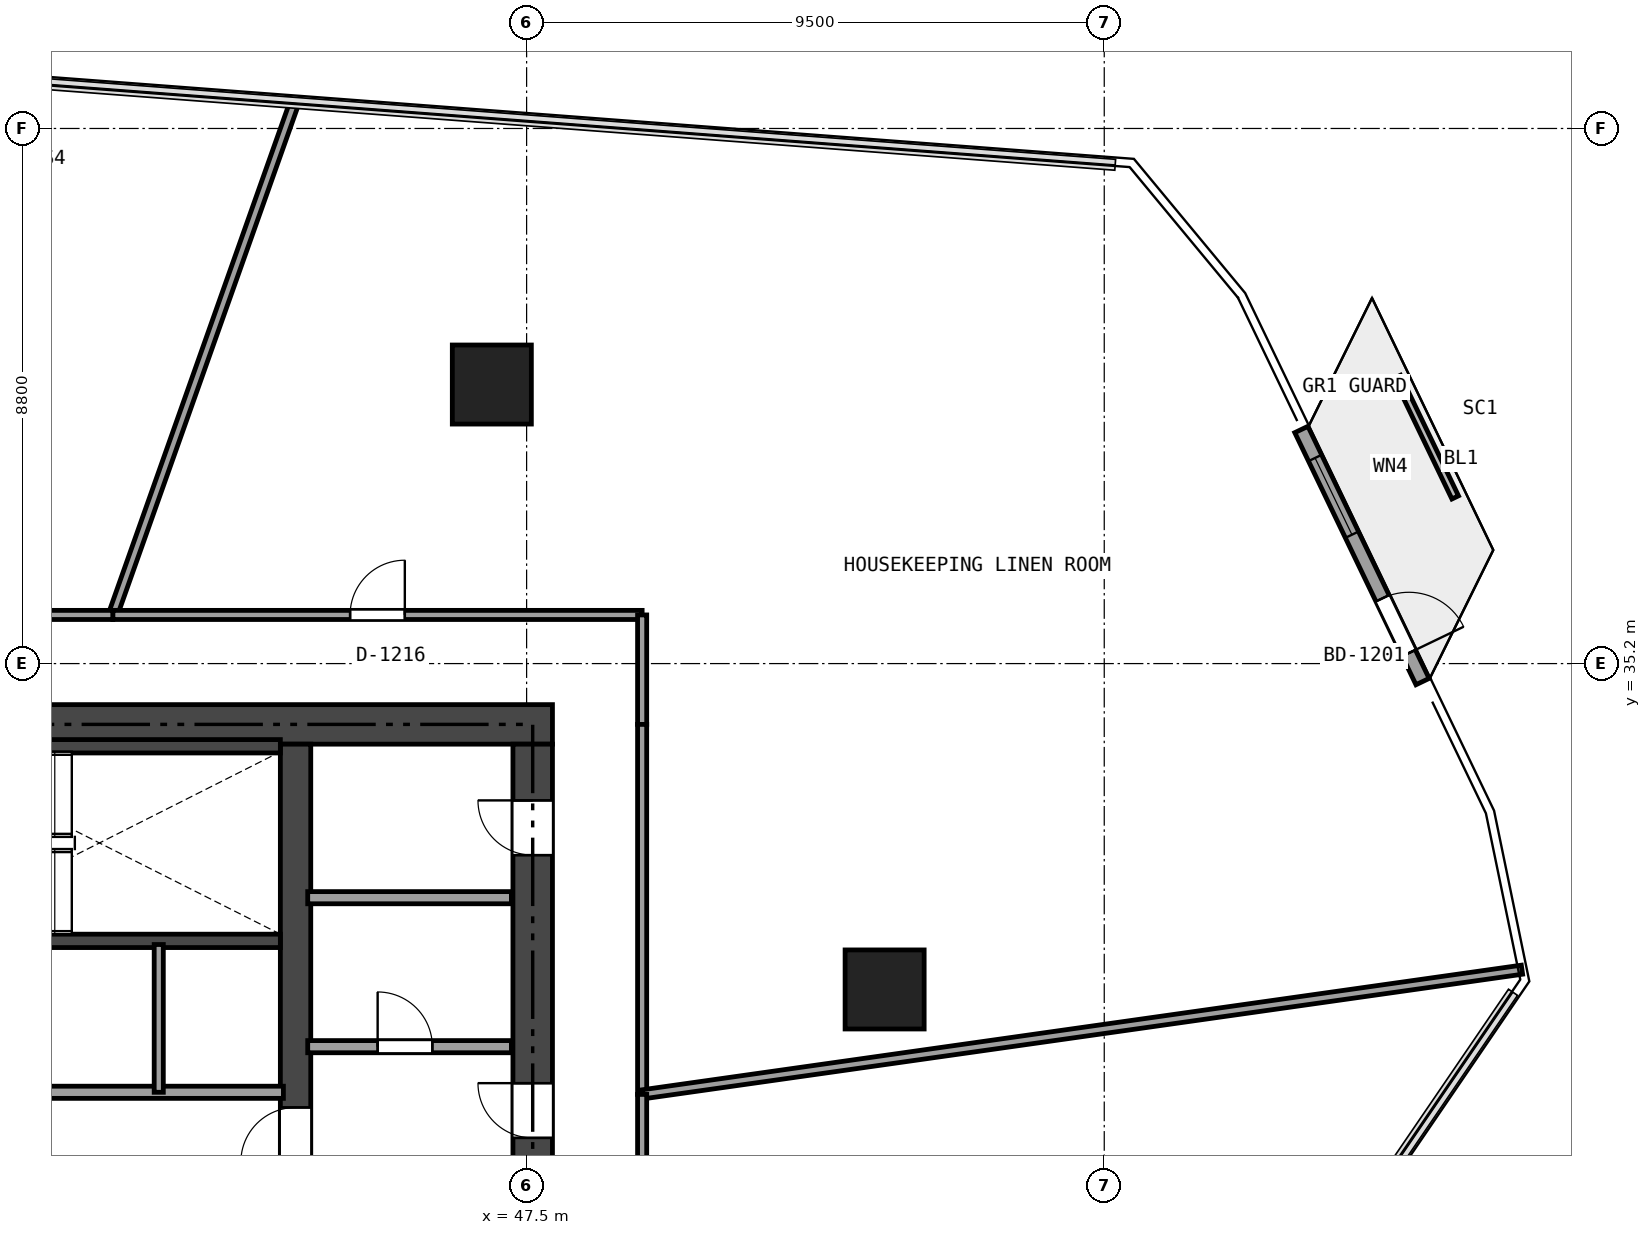
"""IFC4 building model, lengths in metres.
Left out: names, types, materials, properties, quantities, classifications, styles, units other than length and angle.
Written with IfcOpenShell. Run it as: python <this file> out.ifc"""

import sys

from ifc_helpers import new_model, si_unit, direction, frame, frame_2d, origin, origin_2d, place, context, subcontext, project, spatial, rectangle, extrude, element, fill, save


model = new_model("IFC4")
c1 = context("Model", 3, precision=1e-05, world=origin(), true_north=direction((0.0, 1.0)))
c2 = subcontext(c1, "Body", "Model", "MODEL_VIEW")
j1 = project(units=[si_unit("LENGTHUNIT", "METRE"), si_unit("PLANEANGLEUNIT", "RADIAN")], contexts=[c1])
p1 = place(None, origin())
s1 = spatial("IfcSite", under=j1, at=p1, CompositionType="ELEMENT")
p2 = place(p1, origin())
s2 = spatial("IfcBuilding", under=s1, at=p2, CompositionType="ELEMENT")
p3 = place(p2, frame((0.0, 0.0, 51.15)))
s3 = spatial("IfcBuildingStorey", under=s2, at=p3, CompositionType="ELEMENT", Elevation=51.15)
p4 = place(p3, frame((26.475, 34.2, 0.0), z_axis=(0.0, 0.0, 1.0), x_axis=(1.0, 0.0, 0.0)))
e1 = element("IfcWall", 1, at=p4, inside=s3, PredefinedType="SHEAR", context=c2, shape_type="SweptSolid", body=[
    extrude(rectangle(XDim=21.45, YDim=0.65, at=frame_2d((10.725, 0.0))), origin(), (0.0, 0.0, 1.0), 3.17),
])
p5 = place(p4, frame((9.725, 0.0, 0.0)))
e2 = element("IfcOpeningElement", 2, at=p5, cuts=e1, PredefinedType="OPENING", context=c2, shape_type="SweptSolid", body=[
    extrude(rectangle(XDim=1.1, YDim=2.15, at=frame_2d((0.55, 1.075))), frame((0.0, 0.335, 0.0), z_axis=(0.0, -1.0, 0.0), x_axis=(1.0, 0.0, 0.0)), (0.0, 0.0, 1.0), 0.67),
])
p6 = place(p4, frame((1.975, 0.0, 0.0)))
e3 = element("IfcOpeningElement", 3, at=p6, cuts=e1, PredefinedType="OPENING", context=c2, shape_type="SweptSolid", body=[
    extrude(rectangle(XDim=0.9, YDim=2.1, at=frame_2d((0.45, 1.05))), frame((0.0, 0.335, 0.0), z_axis=(0.0, -1.0, 0.0), x_axis=(1.0, 0.0, 0.0)), (0.0, 0.0, 1.0), 0.67),
])
p7 = place(p4, frame((6.275, 0.0, 0.0)))
e4 = element("IfcOpeningElement", 4, at=p7, cuts=e1, PredefinedType="OPENING", context=c2, shape_type="SweptSolid", body=[
    extrude(rectangle(XDim=0.9, YDim=2.1, at=frame_2d((0.45, 1.05))), frame((0.0, 0.335, 0.0), z_axis=(0.0, -1.0, 0.0), x_axis=(1.0, 0.0, 0.0)), (0.0, 0.0, 1.0), 0.67),
])
p8 = place(p3, frame((47.6, 18.925, 0.0), z_axis=(0.0, 0.0, 1.0), x_axis=(0.0, 1.0, 0.0)))
e5 = element("IfcWall", 5, at=p8, inside=s3, PredefinedType="SHEAR", context=c2, shape_type="SweptSolid", body=[
    extrude(rectangle(XDim=14.95, YDim=0.65, at=frame_2d((7.475, 0.0))), origin(), (0.0, 0.0, 1.0), 3.17),
])
p9 = place(p8, frame((6.575, 0.0, 0.0)))
e6 = element("IfcOpeningElement", 6, at=p9, cuts=e5, PredefinedType="OPENING", context=c2, shape_type="SweptSolid", body=[
    extrude(rectangle(XDim=1.1, YDim=2.15, at=frame_2d((0.55, 1.075))), frame((0.0, 0.335, 0.0), z_axis=(0.0, -1.0, 0.0), x_axis=(1.0, 0.0, 0.0)), (0.0, 0.0, 1.0), 0.67),
])
p10 = place(p8, frame((8.475, 0.0, 0.0)))
e7 = element("IfcOpeningElement", 7, at=p10, cuts=e5, PredefinedType="OPENING", context=c2, shape_type="SweptSolid", body=[
    extrude(rectangle(XDim=0.9, YDim=2.1, at=frame_2d((0.45, 1.05))), frame((0.0, 0.335, 0.0), z_axis=(0.0, -1.0, 0.0), x_axis=(1.0, 0.0, 0.0)), (0.0, 0.0, 1.0), 0.67),
])
p11 = place(p8, frame((13.125, 0.0, 0.0)))
e8 = element("IfcOpeningElement", 8, at=p11, cuts=e5, PredefinedType="OPENING", context=c2, shape_type="SweptSolid", body=[
    extrude(rectangle(XDim=0.9, YDim=2.1, at=frame_2d((0.45, 1.05))), frame((0.0, 0.335, 0.0), z_axis=(0.0, -1.0, 0.0), x_axis=(1.0, 0.0, 0.0)), (0.0, 0.0, 1.0), 0.67),
])
p12 = place(p3, frame((43.7, 18.925, 0.0), z_axis=(0.0, 0.0, 1.0), x_axis=(0.0, 1.0, 0.0)))
e9 = element("IfcWall", 9, at=p12, inside=s3, PredefinedType="SHEAR", context=c2, shape_type="SweptSolid", body=[
    extrude(rectangle(XDim=14.95, YDim=0.5, at=frame_2d((7.475, 0.0))), origin(), (0.0, 0.0, 1.0), 3.17),
])
p13 = place(p12, frame((8.075, 0.0, 0.0)))
e10 = element("IfcOpeningElement", 10, at=p13, cuts=e9, PredefinedType="OPENING", context=c2, shape_type="SweptSolid", body=[
    extrude(rectangle(XDim=0.9, YDim=2.1, at=frame_2d((0.45, 1.05))), frame((0.0, 0.26, 0.0), z_axis=(0.0, -1.0, 0.0), x_axis=(1.0, 0.0, 0.0)), (0.0, 0.0, 1.0), 0.52),
])
p14 = place(p3, frame((35.84, 30.64, 0.0), z_axis=(0.0, 0.0, 1.0), x_axis=(1.0, 0.0, 0.0)))
e11 = element("IfcWall", 11, at=p14, inside=s3, PredefinedType="SHEAR", context=c2, shape_type="SweptSolid", body=[
    extrude(rectangle(XDim=7.61, YDim=0.22, at=frame_2d((3.805, 0.0))), origin(), (0.0, 0.0, 1.0), 3.17),
])
p15 = place(p3, frame((37.55, 33.84, 0.0), z_axis=(0.0, 0.0, 1.0), x_axis=(1.0, 0.0, 0.0)))
e12 = element("IfcWall", 12, at=p15, inside=s3, PredefinedType="SHEAR", context=c2, shape_type="SweptSolid", body=[
    extrude(rectangle(XDim=5.9, YDim=0.22, at=frame_2d((2.95, 0.0))), origin(), (0.0, 0.0, 1.0), 3.17),
])
for number, where, z_axis, x_axis in (
    (13, (53.388, 29.841, 0.0), (0.0, 0.0, 1.0), (1.0, 0.0, 0.0)),
    (14, (46.928, 39.789, 0.0), (0.0, 0.0, 1.0), (1.0, 0.0, 0.0)),
):
    element("IfcColumn", number, at=place(p3, frame(where, z_axis=z_axis, x_axis=x_axis)), inside=s3, PredefinedType="COLUMN", context=c2, shape_type="SweptSolid", body=[
        extrude(rectangle(XDim=1.3, YDim=1.3, at=origin_2d()), origin(), (0.0, 0.0, 1.0), 3.17),
    ])
p16 = place(p3, frame((60.242, 39.05, 0.0), z_axis=(0.0, 0.0, 1.0), x_axis=(0.433276196911, -0.901261192546, 0.0)))
e15 = element("IfcWall", 15, at=p16, inside=s3, PredefinedType="SOLIDWALL", context=c2, shape_type="SweptSolid", body=[
    extrude(rectangle(XDim=4.6, YDim=0.24, at=frame_2d((2.3, 0.0))), origin(), (0.0, 0.0, 1.0), 3.17),
])
p17 = place(p16, frame((3.08, 0.0, 0.0)))
e16 = element("IfcOpeningElement", 16, at=p17, cuts=e15, PredefinedType="OPENING", context=c2, shape_type="SweptSolid", body=[
    extrude(rectangle(XDim=1.0, YDim=2.15, at=frame_2d((0.5, 1.075))), frame((0.0, 0.13, 0.0), z_axis=(0.0, -1.0, 0.0), x_axis=(1.0, 0.0, 0.0)), (0.0, 0.0, 1.0), 0.26),
])
p18 = place(p16, frame((0.52, 0.0, 0.2)))
e17 = element("IfcOpeningElement", 17, at=p18, cuts=e15, PredefinedType="OPENING", context=c2, shape_type="SweptSolid", body=[
    extrude(rectangle(XDim=1.4, YDim=1.95, at=frame_2d((0.7, 0.975))), frame((0.0, 0.13, 0.0), z_axis=(0.0, -1.0, 0.0), x_axis=(1.0, 0.0, 0.0)), (0.0, 0.0, 1.0), 0.26),
])
p19 = place(p3, frame((43.9, 28.9, 0.0), z_axis=(0.0, 0.0, 1.0), x_axis=(1.0, 0.0, 0.0)))
e18 = element("IfcWall", 18, at=p19, inside=s3, PredefinedType="SOLIDWALL", context=c2, shape_type="SweptSolid", body=[
    extrude(rectangle(XDim=3.35, YDim=0.2, at=frame_2d((1.675, 0.0))), origin(), (0.0, 0.0, 1.0), 3.17),
])
p20 = place(p19, frame((1.15, 0.0, 0.0)))
e19 = element("IfcOpeningElement", 19, at=p20, cuts=e18, PredefinedType="OPENING", context=c2, shape_type="SweptSolid", body=[
    extrude(rectangle(XDim=0.9, YDim=2.1, at=frame_2d((0.45, 1.05))), frame((0.0, 0.11, 0.0), z_axis=(0.0, -1.0, 0.0), x_axis=(1.0, 0.0, 0.0)), (0.0, 0.0, 1.0), 0.22),
])
p21 = place(p3, frame((43.9, 31.35, 0.0), z_axis=(0.0, 0.0, 1.0), x_axis=(1.0, 0.0, 0.0)))
e20 = element("IfcWall", 20, at=p21, inside=s3, PredefinedType="SOLIDWALL", context=c2, shape_type="SweptSolid", body=[
    extrude(rectangle(XDim=3.35, YDim=0.2, at=frame_2d((1.675, 0.0))), origin(), (0.0, 0.0, 1.0), 3.17),
])
p22 = place(p3, frame((35.62, 28.15, 0.0), z_axis=(0.0, 0.0, 1.0), x_axis=(1.0, 0.0, 0.0)))
e21 = element("IfcWall", 21, at=p22, inside=s3, PredefinedType="SOLIDWALL", context=c2, shape_type="SweptSolid", body=[
    extrude(rectangle(XDim=7.88, YDim=0.2, at=frame_2d((3.94, 0.0))), origin(), (0.0, 0.0, 1.0), 3.17),
])
p23 = place(p3, frame((41.45, 28.15, 0.0), z_axis=(0.0, 0.0, 1.0), x_axis=(0.0, 1.0, 0.0)))
e22 = element("IfcWall", 22, at=p23, inside=s3, PredefinedType="PARTITIONING", context=c2, shape_type="SweptSolid", body=[
    extrude(rectangle(XDim=2.43, YDim=0.15, at=frame_2d((1.215, 0.0))), origin(), (0.0, 0.0, 1.0), 3.17),
])
p24 = place(p3, frame((43.695, 44.465, 0.0), z_axis=(0.0, 0.0, 1.0), x_axis=(-0.334136466125, -0.94252470631, 0.0)))
e23 = element("IfcWall", 23, at=p24, inside=s3, PredefinedType="PARTITIONING", context=c2, shape_type="SweptSolid", body=[
    extrude(rectangle(XDim=8.981, YDim=0.15, at=frame_2d((4.491, 0.0))), origin(), (0.0, 0.0, 1.0), 2.355),
])
p25 = place(p3, frame((40.694, 36.0, 0.0), z_axis=(0.0, 0.0, 1.0), x_axis=(1.0, 0.0, 0.0)))
e24 = element("IfcWall", 24, at=p25, inside=s3, PredefinedType="PARTITIONING", context=c2, shape_type="SweptSolid", body=[
    extrude(rectangle(XDim=8.706, YDim=0.15, at=frame_2d((4.353, 0.0))), origin(), (0.0, 0.0, 1.0), 2.355),
])
p26 = place(p25, frame((3.903, 0.0, 0.0)))
e25 = element("IfcOpeningElement", 25, at=p26, cuts=e24, PredefinedType="OPENING", context=c2, shape_type="SweptSolid", body=[
    extrude(rectangle(XDim=0.9, YDim=2.0, at=frame_2d((0.45, 1.0))), frame((0.0, 0.085, 0.0), z_axis=(0.0, -1.0, 0.0), x_axis=(1.0, 0.0, 0.0)), (0.0, 0.0, 1.0), 0.17),
])
p27 = place(p3, frame((49.4, 36.0, 0.0), z_axis=(0.0, 0.0, 1.0), x_axis=(0.0, -1.0, 0.0)))
e26 = element("IfcWall", 26, at=p27, inside=s3, PredefinedType="PARTITIONING", context=c2, shape_type="SweptSolid", body=[
    extrude(rectangle(XDim=1.8, YDim=0.15, at=frame_2d((0.9, 0.0))), origin(), (0.0, 0.0, 1.0), 2.355),
])
p28 = place(p3, frame((49.4, 34.2, 0.0), z_axis=(0.0, 0.0, 1.0), x_axis=(0.0, -1.0, 0.0)))
e27 = element("IfcWall", 27, at=p28, inside=s3, PredefinedType="PARTITIONING", context=c2, shape_type="SweptSolid", body=[
    extrude(rectangle(XDim=6.085, YDim=0.15, at=frame_2d((3.042, 0.0))), origin(), (0.0, 0.0, 1.0), 2.395),
])
p29 = place(p3, frame((49.4, 28.115, 0.0), z_axis=(0.0, 0.0, 1.0), x_axis=(0.990103589489, 0.140338455463, 0.0)))
e28 = element("IfcWall", 28, at=p29, inside=s3, PredefinedType="PARTITIONING", context=c2, shape_type="SweptSolid", body=[
    extrude(rectangle(XDim=14.615, YDim=0.15, at=frame_2d((7.307, 0.0))), origin(), (0.0, 0.0, 1.0), 2.355),
])
p30 = place(p3, frame((27.929, 36.0, 0.0), z_axis=(0.0, 0.0, 1.0), x_axis=(1.0, 0.0, 0.0)))
e29 = element("IfcWall", 29, at=p30, inside=s3, PredefinedType="PARTITIONING", context=c2, shape_type="SweptSolid", body=[
    extrude(rectangle(XDim=12.765, YDim=0.15, at=frame_2d((6.383, 0.0))), origin(), (0.0, 0.0, 1.0), 2.395),
])
p31 = place(p30, frame((5.908, 0.0, 0.0)))
e30 = element("IfcOpeningElement", 30, at=p31, cuts=e29, PredefinedType="OPENING", context=c2, shape_type="SweptSolid", body=[
    extrude(rectangle(XDim=0.95, YDim=2.15, at=frame_2d((0.475, 1.075))), frame((0.0, 0.085, 0.0), z_axis=(0.0, -1.0, 0.0), x_axis=(1.0, 0.0, 0.0)), (0.0, 0.0, 1.0), 0.17),
])
p32 = place(p3, frame((49.4, 28.115, 0.0), z_axis=(0.0, 0.0, 1.0), x_axis=(0.0, -1.0, 0.0)))
e31 = element("IfcWall", 31, at=p32, inside=s3, PredefinedType="PARTITIONING", context=c2, shape_type="SweptSolid", body=[
    extrude(rectangle(XDim=9.515, YDim=0.15, at=frame_2d((4.757, 0.0))), origin(), (0.0, 0.0, 1.0), 2.395),
])
p33 = place(p32, frame((4.282, 0.0, 0.0)))
e32 = element("IfcOpeningElement", 32, at=p33, cuts=e31, PredefinedType="OPENING", context=c2, shape_type="SweptSolid", body=[
    extrude(rectangle(XDim=0.95, YDim=2.15, at=frame_2d((0.475, 1.075))), frame((0.0, 0.085, 0.0), z_axis=(0.0, -1.0, 0.0), x_axis=(1.0, 0.0, 0.0)), (0.0, 0.0, 1.0), 0.17),
])
p34 = place(p17, origin())
e33 = element("IfcDoor", 33, at=p34, inside=s3, OperationType="SINGLE_SWING_RIGHT", PredefinedType="DOOR", context=c2, shape_type="SweptSolid", body=[
    extrude(rectangle(XDim=1.0, YDim=2.15, at=frame_2d((0.5, 1.075))), frame((0.0, 0.025, 0.0), z_axis=(0.0, -1.0, 0.0), x_axis=(1.0, 0.0, 0.0)), (0.0, 0.0, 1.0), 0.05),
])
fill(e16, e33)
p35 = place(p18, origin())
e34 = element("IfcWindow", 34, at=p35, inside=s3, PartitioningType="SINGLE_PANEL", PredefinedType="WINDOW", context=c2, shape_type="SweptSolid", body=[
    extrude(rectangle(XDim=1.4, YDim=1.95, at=frame_2d((0.7, 0.975))), frame((0.0, 0.03, 0.0), z_axis=(0.0, -1.0, 0.0), x_axis=(1.0, 0.0, 0.0)), (0.0, 0.0, 1.0), 0.06),
])
fill(e17, e34)
p36 = place(p13, origin())
e35 = element("IfcDoor", 35, at=p36, inside=s3, OperationType="SINGLE_SWING_LEFT", PredefinedType="DOOR", context=c2, shape_type="SweptSolid", body=[
    extrude(rectangle(XDim=0.9, YDim=2.1, at=frame_2d((0.45, 1.05))), frame((0.0, 0.025, 0.0), z_axis=(0.0, -1.0, 0.0), x_axis=(1.0, 0.0, 0.0)), (0.0, 0.0, 1.0), 0.05),
])
fill(e10, e35)
p37 = place(p10, origin())
e36 = element("IfcDoor", 36, at=p37, inside=s3, OperationType="SINGLE_SWING_RIGHT", PredefinedType="DOOR", context=c2, shape_type="SweptSolid", body=[
    extrude(rectangle(XDim=0.9, YDim=2.1, at=frame_2d((0.45, 1.05))), frame((0.0, 0.025, 0.0), z_axis=(0.0, -1.0, 0.0), x_axis=(1.0, 0.0, 0.0)), (0.0, 0.0, 1.0), 0.05),
])
fill(e7, e36)
p38 = place(p20, origin())
e37 = element("IfcDoor", 37, at=p38, inside=s3, OperationType="SINGLE_SWING_LEFT", PredefinedType="DOOR", context=c2, shape_type="SweptSolid", body=[
    extrude(rectangle(XDim=0.9, YDim=2.1, at=frame_2d((0.45, 1.05))), frame((0.0, 0.025, 0.0), z_axis=(0.0, -1.0, 0.0), x_axis=(1.0, 0.0, 0.0)), (0.0, 0.0, 1.0), 0.05),
])
fill(e19, e37)
p39 = place(p11, origin())
e38 = element("IfcDoor", 38, at=p39, inside=s3, OperationType="SINGLE_SWING_RIGHT", PredefinedType="DOOR", context=c2, shape_type="SweptSolid", body=[
    extrude(rectangle(XDim=0.9, YDim=2.1, at=frame_2d((0.45, 1.05))), frame((0.0, 0.025, 0.0), z_axis=(0.0, -1.0, 0.0), x_axis=(1.0, 0.0, 0.0)), (0.0, 0.0, 1.0), 0.05),
])
fill(e8, e38)
p40 = place(p26, origin())
e39 = element("IfcDoor", 39, at=p40, inside=s3, OperationType="SINGLE_SWING_RIGHT", PredefinedType="DOOR", context=c2, shape_type="SweptSolid", body=[
    extrude(rectangle(XDim=0.9, YDim=2.0, at=frame_2d((0.45, 1.0))), frame((0.0, 0.025, 0.0), z_axis=(0.0, -1.0, 0.0), x_axis=(1.0, 0.0, 0.0)), (0.0, 0.0, 1.0), 0.05),
])
fill(e25, e39)
save(model, sys.argv[1])
